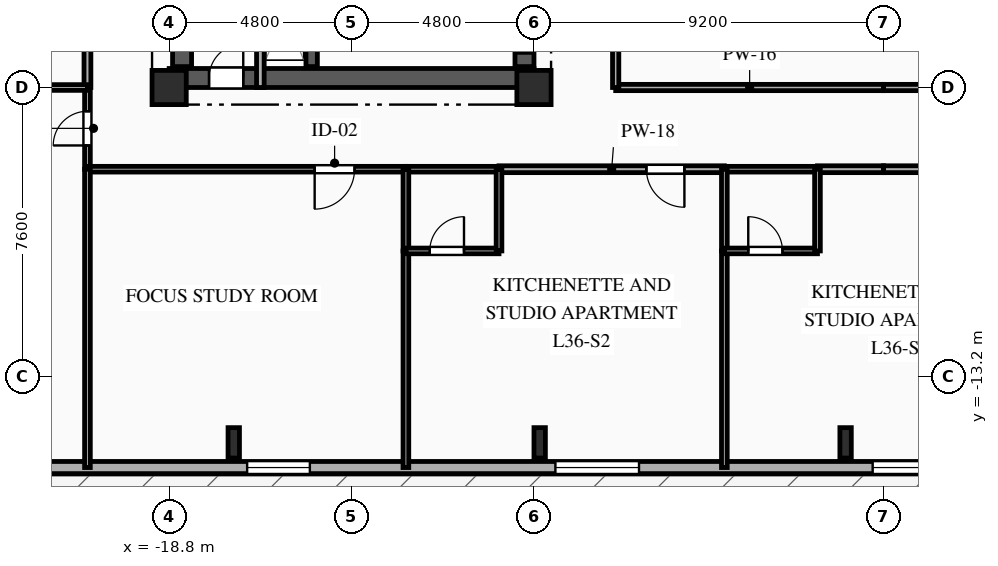
"""IFC4 building model, lengths in metres.
Left out: names, types, materials, properties, quantities, classifications, styles, units other than length and angle.
Written with IfcOpenShell. Run it as: python <this file> out.ifc"""

import sys

from ifc_helpers import new_model, si_unit, direction, frame, frame_2d, origin, origin_2d, place, context, subcontext, project, spatial, rectangle, i_section, extrude, element, fill, save


model = new_model("IFC4")
c1 = context("Model", 3, precision=1e-05, world=origin(), true_north=direction((0.0, 1.0)))
c2 = subcontext(c1, "Body", "Model", "MODEL_VIEW")
j1 = project(units=[si_unit("LENGTHUNIT", "METRE"), si_unit("PLANEANGLEUNIT", "RADIAN")], contexts=[c1])
p1 = place(None, origin())
s1 = spatial("IfcSite", under=j1, at=p1, CompositionType="ELEMENT")
p2 = place(p1, origin())
s2 = spatial("IfcBuilding", under=s1, at=p2, CompositionType="ELEMENT")
p3 = place(p2, frame((0.0, 0.0, 131.0)))
s3 = spatial("IfcBuildingStorey", under=s2, at=p3, CompositionType="ELEMENT", Elevation=131.0)
for number, where, z_axis, x_axis in (
    (1, (-18.8, -5.6, 0.0), (0.0, 0.0, 1.0), (1.0, 0.0, 0.0)),
    (2, (-9.2, -5.6, 0.0), (0.0, 0.0, 1.0), (1.0, 0.0, 0.0)),
):
    element("IfcColumn", number, at=place(p3, frame(where, z_axis=z_axis, x_axis=x_axis)), inside=s3, PredefinedType="COLUMN", context=c2, shape_type="SweptSolid", body=[
        extrude(rectangle(XDim=0.9, YDim=0.9, at=origin_2d()), origin(), (0.0, 0.0, 1.0), 3.35),
    ])
for number, where, z_axis, x_axis in (
    (3, (-17.1, -14.95, 0.0), (0.0, 0.0, 1.0), (1.0, 0.0, 0.0)),
    (4, (-9.05, -14.95, 0.0), (0.0, 0.0, 1.0), (1.0, 0.0, 0.0)),
    (5, (-1.0, -14.95, 0.0), (0.0, 0.0, 1.0), (1.0, 0.0, 0.0)),
):
    element("IfcColumn", number, at=place(p3, frame(where, z_axis=z_axis, x_axis=x_axis)), inside=s3, PredefinedType="COLUMN", context=c2, shape_type="SweptSolid", body=[
        extrude(i_section(OverallWidth=0.3, OverallDepth=0.8, WebThickness=0.018, FlangeThickness=0.033, FilletRadius=0.03, at=origin_2d()), origin(), (0.0, 0.0, 1.0), 3.35),
    ])
p4 = place(p3, frame((23.8, -15.6, 0.0), z_axis=(0.0, 0.0, 1.0), x_axis=(-1.0, 0.0, 0.0)))
e6 = element("IfcWall", 6, at=p4, inside=s3, PredefinedType="SOLIDWALL", context=c2, shape_type="SweptSolid", body=[
    extrude(rectangle(XDim=49.6, YDim=0.32, at=frame_2d((24.8, 0.0))), origin(), (0.0, 0.0, 1.0), 3.04),
])
p5 = place(p4, frame((1.13, 0.0, 0.85)))
e7 = element("IfcOpeningElement", 7, at=p5, cuts=e6, PredefinedType="OPENING", context=c2, shape_type="SweptSolid", body=[
    extrude(rectangle(XDim=1.1, YDim=1.85, at=frame_2d((0.55, 0.925))), frame((0.0, 0.17, 0.0), z_axis=(0.0, -1.0, 0.0), x_axis=(1.0, 0.0, 0.0)), (0.0, 0.0, 1.0), 0.34),
])
p6 = place(p4, frame((6.255, 0.0, 0.85)))
e8 = element("IfcOpeningElement", 8, at=p6, cuts=e6, PredefinedType="OPENING", context=c2, shape_type="SweptSolid", body=[
    extrude(rectangle(XDim=1.65, YDim=1.85, at=frame_2d((0.825, 0.925))), frame((0.0, 0.17, 0.0), z_axis=(0.0, -1.0, 0.0), x_axis=(1.0, 0.0, 0.0)), (0.0, 0.0, 1.0), 0.34),
])
p7 = place(p4, frame((14.38, 0.0, 0.85)))
e9 = element("IfcOpeningElement", 9, at=p7, cuts=e6, PredefinedType="OPENING", context=c2, shape_type="SweptSolid", body=[
    extrude(rectangle(XDim=2.2, YDim=1.85, at=frame_2d((1.1, 0.925))), frame((0.0, 0.17, 0.0), z_axis=(0.0, -1.0, 0.0), x_axis=(1.0, 0.0, 0.0)), (0.0, 0.0, 1.0), 0.34),
])
p8 = place(p4, frame((21.888, 0.0, 0.85)))
e10 = element("IfcOpeningElement", 10, at=p8, cuts=e6, PredefinedType="OPENING", context=c2, shape_type="SweptSolid", body=[
    extrude(rectangle(XDim=2.2, YDim=1.85, at=frame_2d((1.1, 0.925))), frame((0.0, 0.17, 0.0), z_axis=(0.0, -1.0, 0.0), x_axis=(1.0, 0.0, 0.0)), (0.0, 0.0, 1.0), 0.34),
])
p9 = place(p4, frame((30.236, 0.0, 0.85)))
e11 = element("IfcOpeningElement", 11, at=p9, cuts=e6, PredefinedType="OPENING", context=c2, shape_type="SweptSolid", body=[
    extrude(rectangle(XDim=2.2, YDim=1.85, at=frame_2d((1.1, 0.925))), frame((0.0, 0.17, 0.0), z_axis=(0.0, -1.0, 0.0), x_axis=(1.0, 0.0, 0.0)), (0.0, 0.0, 1.0), 0.34),
])
p10 = place(p4, frame((38.897, 0.0, 0.85)))
e12 = element("IfcOpeningElement", 12, at=p10, cuts=e6, PredefinedType="OPENING", context=c2, shape_type="SweptSolid", body=[
    extrude(rectangle(XDim=1.65, YDim=1.85, at=frame_2d((0.825, 0.925))), frame((0.0, 0.17, 0.0), z_axis=(0.0, -1.0, 0.0), x_axis=(1.0, 0.0, 0.0)), (0.0, 0.0, 1.0), 0.34),
])
p11 = place(p4, frame((46.175, 0.0, 0.85)))
e13 = element("IfcOpeningElement", 13, at=p11, cuts=e6, PredefinedType="OPENING", context=c2, shape_type="SweptSolid", body=[
    extrude(rectangle(XDim=1.65, YDim=1.85, at=frame_2d((0.825, 0.925))), frame((0.0, 0.17, 0.0), z_axis=(0.0, -1.0, 0.0), x_axis=(1.0, 0.0, 0.0)), (0.0, 0.0, 1.0), 0.34),
])
p12 = place(p3, frame((-23.376, -19.829, 0.0), z_axis=(0.0, 0.0, 1.0), x_axis=(0.994522202864, 0.104525537599, 0.0)))
e14 = element("IfcWall", 14, at=p12, inside=s3, PredefinedType="PARAPET", context=c2, shape_type="SweptSolid", body=[
    extrude(rectangle(XDim=38.546, YDim=0.22, at=frame_2d((19.273, 0.0))), origin(), (0.0, 0.0, 1.0), 0.65),
])
p13 = place(p3, frame((-18.8, -5.35, 0.0), z_axis=(0.0, 0.0, 1.0), x_axis=(1.0, 0.0, 0.0)))
e15 = element("IfcWall", 15, at=p13, inside=s3, PredefinedType="SHEAR", context=c2, shape_type="SweptSolid", body=[
    extrude(rectangle(XDim=9.6, YDim=0.5, at=frame_2d((4.8, 0.0))), origin(), (0.0, 0.0, 1.0), 3.04),
])
p14 = place(p13, frame((1.05, 0.0, 0.0)))
e16 = element("IfcOpeningElement", 16, at=p14, cuts=e15, PredefinedType="OPENING", context=c2, shape_type="SweptSolid", body=[
    extrude(rectangle(XDim=0.9, YDim=2.1, at=frame_2d((0.45, 1.05))), frame((0.0, 0.26, 0.0), z_axis=(0.0, -1.0, 0.0), x_axis=(1.0, 0.0, 0.0)), (0.0, 0.0, 1.0), 0.52),
])
p15 = place(p3, frame((-18.46, -5.05, 0.0), z_axis=(0.0, 0.0, 1.0), x_axis=(0.0, 1.0, 0.0)))
e17 = element("IfcWall", 17, at=p15, inside=s3, PredefinedType="SHEAR", context=c2, shape_type="SweptSolid", body=[
    extrude(rectangle(XDim=10.1, YDim=0.5, at=frame_2d((5.05, 0.0))), origin(), (0.0, 0.0, 1.0), 3.04),
])
p16 = place(p3, frame((-9.45, -5.05, 0.0), z_axis=(0.0, 0.0, 1.0), x_axis=(0.0, 1.0, 0.0)))
e18 = element("IfcWall", 18, at=p16, inside=s3, PredefinedType="SHEAR", context=c2, shape_type="SweptSolid", body=[
    extrude(rectangle(XDim=10.1, YDim=0.5, at=frame_2d((5.05, 0.0))), origin(), (0.0, 0.0, 1.0), 3.04),
])
p17 = place(p16, frame((7.15, 0.0, 0.0)))
e19 = element("IfcOpeningElement", 19, at=p17, cuts=e18, PredefinedType="OPENING", context=c2, shape_type="SweptSolid", body=[
    extrude(rectangle(XDim=0.9, YDim=2.1, at=frame_2d((0.45, 1.05))), frame((0.0, 0.26, 0.0), z_axis=(0.0, -1.0, 0.0), x_axis=(1.0, 0.0, 0.0)), (0.0, 0.0, 1.0), 0.52),
])
p18 = place(p16, frame((2.4, 0.0, 0.0)))
e20 = element("IfcOpeningElement", 20, at=p18, cuts=e18, PredefinedType="OPENING", context=c2, shape_type="SweptSolid", body=[
    extrude(rectangle(XDim=1.2, YDim=2.15, at=frame_2d((0.6, 1.075))), frame((0.0, 0.26, 0.0), z_axis=(0.0, -1.0, 0.0), x_axis=(1.0, 0.0, 0.0)), (0.0, 0.0, 1.0), 0.52),
])
p19 = place(p16, frame((0.35, 0.0, 0.0)))
e21 = element("IfcOpeningElement", 21, at=p19, cuts=e18, PredefinedType="OPENING", context=c2, shape_type="SweptSolid", body=[
    extrude(rectangle(XDim=0.9, YDim=2.1, at=frame_2d((0.45, 1.05))), frame((0.0, 0.26, 0.0), z_axis=(0.0, -1.0, 0.0), x_axis=(1.0, 0.0, 0.0)), (0.0, 0.0, 1.0), 0.52),
])
p20 = place(p16, frame((5.0, 0.0, 0.0)))
e22 = element("IfcOpeningElement", 22, at=p20, cuts=e18, PredefinedType="OPENING", context=c2, shape_type="SweptSolid", body=[
    extrude(rectangle(XDim=0.9, YDim=2.1, at=frame_2d((0.45, 1.05))), frame((0.0, 0.26, 0.0), z_axis=(0.0, -1.0, 0.0), x_axis=(1.0, 0.0, 0.0)), (0.0, 0.0, 1.0), 0.52),
])
p21 = place(p3, frame((-15.05, -5.05, 0.0), z_axis=(0.0, 0.0, 1.0), x_axis=(0.0, 1.0, 0.0)))
e23 = element("IfcWall", 23, at=p21, inside=s3, PredefinedType="SHEAR", context=c2, shape_type="SweptSolid", body=[
    extrude(rectangle(XDim=10.1, YDim=0.3, at=frame_2d((5.05, 0.0))), origin(), (0.0, 0.0, 1.0), 3.04),
])
p22 = place(p3, frame((-16.4, -5.6, 0.0), z_axis=(0.0, 0.0, 1.0), x_axis=(0.0, 1.0, 0.0)))
e24 = element("IfcWall", 24, at=p22, inside=s3, PredefinedType="PARTITIONING", context=c2, shape_type="SweptSolid", body=[
    extrude(rectangle(XDim=3.49, YDim=0.2, at=frame_2d((1.745, 0.0))), origin(), (0.0, 0.0, 1.0), 3.04),
])
p23 = place(p3, frame((-20.95, -7.75, 0.0), z_axis=(0.0, 0.0, 1.0), x_axis=(0.0, 1.0, 0.0)))
e25 = element("IfcWall", 25, at=p23, inside=s3, PredefinedType="PARTITIONING", context=c2, shape_type="SweptSolid", body=[
    extrude(rectangle(XDim=2.15, YDim=0.15, at=frame_2d((1.075, 0.0))), origin(), (0.0, 0.0, 1.0), 3.04),
])
p24 = place(p23, frame((0.625, 0.0, 0.0)))
e26 = element("IfcOpeningElement", 26, at=p24, cuts=e25, PredefinedType="OPENING", context=c2, shape_type="SweptSolid", body=[
    extrude(rectangle(XDim=0.9, YDim=2.1, at=frame_2d((0.45, 1.05))), frame((0.0, 0.085, 0.0), z_axis=(0.0, -1.0, 0.0), x_axis=(1.0, 0.0, 0.0)), (0.0, 0.0, 1.0), 0.17),
])
p25 = place(p3, frame((-12.57, -7.75, 0.0), z_axis=(0.0, 0.0, 1.0), x_axis=(-1.0, 0.0, 0.0)))
e27 = element("IfcWall", 27, at=p25, inside=s3, PredefinedType="PARTITIONING", context=c2, shape_type="SweptSolid", body=[
    extrude(rectangle(XDim=8.38, YDim=0.15, at=frame_2d((4.19, 0.0))), origin(), (0.0, 0.0, 1.0), 3.04),
])
p26 = place(p25, frame((1.351, 0.0, 0.0)))
e28 = element("IfcOpeningElement", 28, at=p26, cuts=e27, PredefinedType="OPENING", context=c2, shape_type="SweptSolid", body=[
    extrude(rectangle(XDim=1.05, YDim=2.15, at=frame_2d((0.525, 1.075))), frame((0.0, 0.085, 0.0), z_axis=(0.0, -1.0, 0.0), x_axis=(1.0, 0.0, 0.0)), (0.0, 0.0, 1.0), 0.17),
])
p27 = place(p3, frame((-4.19, -7.75, 0.0), z_axis=(0.0, 0.0, 1.0), x_axis=(-1.0, 0.0, 0.0)))
e29 = element("IfcWall", 29, at=p27, inside=s3, PredefinedType="PARTITIONING", context=c2, shape_type="SweptSolid", body=[
    extrude(rectangle(XDim=5.93, YDim=0.18, at=frame_2d((2.965, 0.0))), origin(), (0.0, 0.0, 1.0), 3.04),
])
p28 = place(p27, frame((1.051, 0.0, 0.0)))
e30 = element("IfcOpeningElement", 30, at=p28, cuts=e29, PredefinedType="OPENING", context=c2, shape_type="SweptSolid", body=[
    extrude(rectangle(XDim=1.0, YDim=2.15, at=frame_2d((0.5, 1.075))), frame((0.0, 0.1, 0.0), z_axis=(0.0, -1.0, 0.0), x_axis=(1.0, 0.0, 0.0)), (0.0, 0.0, 1.0), 0.2),
])
p29 = place(p3, frame((-10.12, -7.75, 0.0), z_axis=(0.0, 0.0, 1.0), x_axis=(-1.0, 0.0, 0.0)))
e31 = element("IfcWall", 31, at=p29, inside=s3, PredefinedType="PLUMBINGWALL", context=c2, shape_type="SweptSolid", body=[
    extrude(rectangle(XDim=2.45, YDim=0.15, at=frame_2d((1.225, 0.0))), origin(), (0.0, 0.0, 1.0), 3.04),
])
p30 = place(p3, frame((0.0, -7.75, 0.0), z_axis=(0.0, 0.0, 1.0), x_axis=(-1.0, 0.0, 0.0)))
e32 = element("IfcWall", 32, at=p30, inside=s3, PredefinedType="PARTITIONING", context=c2, shape_type="SweptSolid", body=[
    extrude(rectangle(XDim=1.74, YDim=0.18, at=frame_2d((0.87, 0.0))), origin(), (0.0, 0.0, 1.0), 3.04),
])
p31 = place(p3, frame((-1.74, -7.75, 0.0), z_axis=(0.0, 0.0, 1.0), x_axis=(-1.0, 0.0, 0.0)))
e33 = element("IfcWall", 33, at=p31, inside=s3, PredefinedType="PLUMBINGWALL", context=c2, shape_type="SweptSolid", body=[
    extrude(rectangle(XDim=2.45, YDim=0.15, at=frame_2d((1.225, 0.0))), origin(), (0.0, 0.0, 1.0), 3.04),
])
p32 = place(p3, frame((-7.05, -5.6, 0.0), z_axis=(0.0, 0.0, 1.0), x_axis=(1.0, 0.0, 0.0)))
e34 = element("IfcWall", 34, at=p32, inside=s3, PredefinedType="PARTITIONING", context=c2, shape_type="SweptSolid", body=[
    extrude(rectangle(XDim=7.05, YDim=0.165, at=frame_2d((3.525, 0.0))), origin(), (0.0, 0.0, 1.0), 2.525),
])
p33 = place(p3, frame((4.19, -7.75, 0.0), z_axis=(0.0, 0.0, 1.0), x_axis=(-1.0, 0.0, 0.0)))
e35 = element("IfcWall", 35, at=p33, inside=s3, PredefinedType="PARTITIONING", context=c2, shape_type="SweptSolid", body=[
    extrude(rectangle(XDim=4.19, YDim=0.18, at=frame_2d((2.095, 0.0))), origin(), (0.0, 0.0, 1.0), 3.04),
])
p34 = place(p33, frame((2.103, 0.0, 0.0)))
e36 = element("IfcOpeningElement", 36, at=p34, cuts=e35, PredefinedType="OPENING", context=c2, shape_type="SweptSolid", body=[
    extrude(rectangle(XDim=1.0, YDim=2.15, at=frame_2d((0.5, 1.075))), frame((0.0, 0.1, 0.0), z_axis=(0.0, -1.0, 0.0), x_axis=(1.0, 0.0, 0.0)), (0.0, 0.0, 1.0), 0.2),
])
p35 = place(p3, frame((0.0, -5.6, 0.0), z_axis=(0.0, 0.0, 1.0), x_axis=(1.0, 0.0, 0.0)))
e37 = element("IfcWall", 37, at=p35, inside=s3, PredefinedType="PARTITIONING", context=c2, shape_type="SweptSolid", body=[
    extrude(rectangle(XDim=7.05, YDim=0.165, at=frame_2d((3.525, 0.0))), origin(), (0.0, 0.0, 1.0), 2.525),
])
p36 = place(p3, frame((-20.95, -5.6, 0.0), z_axis=(0.0, 0.0, 1.0), x_axis=(0.0, 1.0, 0.0)))
e38 = element("IfcWall", 38, at=p36, inside=s3, PredefinedType="PARTITIONING", context=c2, shape_type="SweptSolid", body=[
    extrude(rectangle(XDim=14.1, YDim=0.18, at=frame_2d((7.05, 0.0))), origin(), (0.0, 0.0, 1.0), 3.04),
])
p37 = place(p36, frame((5.058, 0.0, 0.0)))
e39 = element("IfcOpeningElement", 39, at=p37, cuts=e38, PredefinedType="OPENING", context=c2, shape_type="SweptSolid", body=[
    extrude(rectangle(XDim=1.0, YDim=2.15, at=frame_2d((0.5, 1.075))), frame((0.0, 0.1, 0.0), z_axis=(0.0, -1.0, 0.0), x_axis=(1.0, 0.0, 0.0)), (0.0, 0.0, 1.0), 0.2),
])
p38 = place(p3, frame((-7.05, -2.95, 0.0), z_axis=(0.0, 0.0, 1.0), x_axis=(0.0, -1.0, 0.0)))
e40 = element("IfcWall", 40, at=p38, inside=s3, PredefinedType="PARTITIONING", context=c2, shape_type="SweptSolid", body=[
    extrude(rectangle(XDim=2.65, YDim=0.165, at=frame_2d((1.325, 0.0))), origin(), (0.0, 0.0, 1.0), 3.04),
])
p39 = place(p3, frame((-20.95, -5.6, 0.0), z_axis=(0.0, 0.0, 1.0), x_axis=(-1.0, 0.0, 0.0)))
e41 = element("IfcWall", 41, at=p39, inside=s3, PredefinedType="PARTITIONING", context=c2, shape_type="SweptSolid", body=[
    extrude(rectangle(XDim=2.65, YDim=0.15, at=frame_2d((1.325, 0.0))), origin(), (0.0, 0.0, 1.0), 3.04),
])
p40 = place(p39, frame((0.965, 0.0, 0.0)))
e42 = element("IfcOpeningElement", 42, at=p40, cuts=e41, PredefinedType="OPENING", context=c2, shape_type="SweptSolid", body=[
    extrude(rectangle(XDim=1.05, YDim=2.15, at=frame_2d((0.525, 1.075))), frame((0.0, 0.085, 0.0), z_axis=(0.0, -1.0, 0.0), x_axis=(1.0, 0.0, 0.0)), (0.0, 0.0, 1.0), 0.17),
])
p41 = place(p3, frame((-20.95, -7.75, 0.0), z_axis=(0.0, 0.0, 1.0), x_axis=(0.0, -1.0, 0.0)))
e43 = element("IfcWall", 43, at=p41, inside=s3, PredefinedType="PARTITIONING", context=c2, shape_type="SweptSolid", body=[
    extrude(rectangle(XDim=7.85, YDim=0.15, at=frame_2d((3.925, 0.0))), origin(), (0.0, 0.0, 1.0), 3.04),
])
p42 = place(p3, frame((-12.57, -9.9, 0.0), z_axis=(0.0, 0.0, 1.0), x_axis=(0.0, -1.0, 0.0)))
e44 = element("IfcWall", 44, at=p42, inside=s3, PredefinedType="PARTITIONING", context=c2, shape_type="SweptSolid", body=[
    extrude(rectangle(XDim=5.7, YDim=0.15, at=frame_2d((2.85, 0.0))), origin(), (0.0, 0.0, 1.0), 3.04),
])
p43 = place(p3, frame((-12.57, -7.75, 0.0), z_axis=(0.0, 0.0, 1.0), x_axis=(0.0, -1.0, 0.0)))
e45 = element("IfcWall", 45, at=p43, inside=s3, PredefinedType="PLUMBINGWALL", context=c2, shape_type="SweptSolid", body=[
    extrude(rectangle(XDim=2.15, YDim=0.15, at=frame_2d((1.075, 0.0))), origin(), (0.0, 0.0, 1.0), 3.04),
])
p44 = place(p3, frame((-12.57, -9.9, 0.0), z_axis=(0.0, 0.0, 1.0), x_axis=(1.0, 0.0, 0.0)))
e46 = element("IfcWall", 46, at=p44, inside=s3, PredefinedType="PLUMBINGWALL", context=c2, shape_type="SweptSolid", body=[
    extrude(rectangle(XDim=2.45, YDim=0.15, at=frame_2d((1.225, 0.0))), origin(), (0.0, 0.0, 1.0), 3.04),
])
p45 = place(p44, frame((0.629, 0.0, 0.0)))
e47 = element("IfcOpeningElement", 47, at=p45, cuts=e46, PredefinedType="OPENING", context=c2, shape_type="SweptSolid", body=[
    extrude(rectangle(XDim=0.9, YDim=2.1, at=frame_2d((0.45, 1.05))), frame((0.0, 0.085, 0.0), z_axis=(0.0, -1.0, 0.0), x_axis=(1.0, 0.0, 0.0)), (0.0, 0.0, 1.0), 0.17),
])
p46 = place(p3, frame((-10.12, -9.9, 0.0), z_axis=(0.0, 0.0, 1.0), x_axis=(0.0, 1.0, 0.0)))
e48 = element("IfcWall", 48, at=p46, inside=s3, PredefinedType="PLUMBINGWALL", context=c2, shape_type="SweptSolid", body=[
    extrude(rectangle(XDim=2.15, YDim=0.15, at=frame_2d((1.075, 0.0))), origin(), (0.0, 0.0, 1.0), 3.04),
])
p47 = place(p3, frame((-4.19, -9.9, 0.0), z_axis=(0.0, 0.0, 1.0), x_axis=(0.0, -1.0, 0.0)))
e49 = element("IfcWall", 49, at=p47, inside=s3, PredefinedType="PARTITIONING", context=c2, shape_type="SweptSolid", body=[
    extrude(rectangle(XDim=5.7, YDim=0.15, at=frame_2d((2.85, 0.0))), origin(), (0.0, 0.0, 1.0), 3.04),
])
p48 = place(p3, frame((-4.19, -7.75, 0.0), z_axis=(0.0, 0.0, 1.0), x_axis=(0.0, -1.0, 0.0)))
e50 = element("IfcWall", 50, at=p48, inside=s3, PredefinedType="PLUMBINGWALL", context=c2, shape_type="SweptSolid", body=[
    extrude(rectangle(XDim=2.15, YDim=0.15, at=frame_2d((1.075, 0.0))), origin(), (0.0, 0.0, 1.0), 3.04),
])
p49 = place(p3, frame((-4.19, -9.9, 0.0), z_axis=(0.0, 0.0, 1.0), x_axis=(1.0, 0.0, 0.0)))
e51 = element("IfcWall", 51, at=p49, inside=s3, PredefinedType="PLUMBINGWALL", context=c2, shape_type="SweptSolid", body=[
    extrude(rectangle(XDim=2.45, YDim=0.15, at=frame_2d((1.225, 0.0))), origin(), (0.0, 0.0, 1.0), 3.04),
])
p50 = place(p49, frame((0.629, 0.0, 0.0)))
e52 = element("IfcOpeningElement", 52, at=p50, cuts=e51, PredefinedType="OPENING", context=c2, shape_type="SweptSolid", body=[
    extrude(rectangle(XDim=0.9, YDim=2.1, at=frame_2d((0.45, 1.05))), frame((0.0, 0.085, 0.0), z_axis=(0.0, -1.0, 0.0), x_axis=(1.0, 0.0, 0.0)), (0.0, 0.0, 1.0), 0.17),
])
p51 = place(p3, frame((-1.74, -9.9, 0.0), z_axis=(0.0, 0.0, 1.0), x_axis=(0.0, 1.0, 0.0)))
e53 = element("IfcWall", 53, at=p51, inside=s3, PredefinedType="PLUMBINGWALL", context=c2, shape_type="SweptSolid", body=[
    extrude(rectangle(XDim=2.15, YDim=0.15, at=frame_2d((1.075, 0.0))), origin(), (0.0, 0.0, 1.0), 3.04),
])
p52 = place(p8, origin())
e54 = element("IfcWindow", 54, at=p52, inside=s3, PartitioningType="SINGLE_PANEL", PredefinedType="WINDOW", context=c2, shape_type="SweptSolid", body=[
    extrude(rectangle(XDim=2.2, YDim=1.85, at=frame_2d((1.1, 0.925))), frame((0.0, 0.03, 0.0), z_axis=(0.0, -1.0, 0.0), x_axis=(1.0, 0.0, 0.0)), (0.0, 0.0, 1.0), 0.06),
])
fill(e10, e54)
p53 = place(p9, origin())
e55 = element("IfcWindow", 55, at=p53, inside=s3, PartitioningType="SINGLE_PANEL", PredefinedType="WINDOW", context=c2, shape_type="SweptSolid", body=[
    extrude(rectangle(XDim=2.2, YDim=1.85, at=frame_2d((1.1, 0.925))), frame((0.0, 0.03, 0.0), z_axis=(0.0, -1.0, 0.0), x_axis=(1.0, 0.0, 0.0)), (0.0, 0.0, 1.0), 0.06),
])
fill(e11, e55)
p54 = place(p10, origin())
e56 = element("IfcWindow", 56, at=p54, inside=s3, PartitioningType="SINGLE_PANEL", PredefinedType="WINDOW", context=c2, shape_type="SweptSolid", body=[
    extrude(rectangle(XDim=1.65, YDim=1.85, at=frame_2d((0.825, 0.925))), frame((0.0, 0.03, 0.0), z_axis=(0.0, -1.0, 0.0), x_axis=(1.0, 0.0, 0.0)), (0.0, 0.0, 1.0), 0.06),
])
fill(e12, e56)
p55 = place(p14, origin())
e57 = element("IfcDoor", 57, at=p55, inside=s3, OperationType="SINGLE_SWING_RIGHT", PredefinedType="DOOR", context=c2, shape_type="SweptSolid", body=[
    extrude(rectangle(XDim=0.9, YDim=2.1, at=frame_2d((0.45, 1.05))), frame((0.0, 0.025, 0.0), z_axis=(0.0, -1.0, 0.0), x_axis=(1.0, 0.0, 0.0)), (0.0, 0.0, 1.0), 0.05),
])
fill(e16, e57)
p56 = place(p19, origin())
e58 = element("IfcDoor", 58, at=p56, inside=s3, OperationType="SINGLE_SWING_RIGHT", PredefinedType="DOOR", context=c2, shape_type="SweptSolid", body=[
    extrude(rectangle(XDim=0.9, YDim=2.1, at=frame_2d((0.45, 1.05))), frame((0.0, 0.025, 0.0), z_axis=(0.0, -1.0, 0.0), x_axis=(1.0, 0.0, 0.0)), (0.0, 0.0, 1.0), 0.05),
])
fill(e21, e58)
p57 = place(p24, origin())
e59 = element("IfcDoor", 59, at=p57, inside=s3, OperationType="SINGLE_SWING_LEFT", PredefinedType="DOOR", context=c2, shape_type="SweptSolid", body=[
    extrude(rectangle(XDim=0.9, YDim=2.1, at=frame_2d((0.45, 1.05))), frame((0.0, 0.025, 0.0), z_axis=(0.0, -1.0, 0.0), x_axis=(1.0, 0.0, 0.0)), (0.0, 0.0, 1.0), 0.05),
])
fill(e26, e59)
p58 = place(p26, origin())
e60 = element("IfcDoor", 60, at=p58, inside=s3, OperationType="SINGLE_SWING_RIGHT", PredefinedType="DOOR", context=c2, shape_type="SweptSolid", body=[
    extrude(rectangle(XDim=1.05, YDim=2.15, at=frame_2d((0.525, 1.075))), frame((0.0, 0.025, 0.0), z_axis=(0.0, -1.0, 0.0), x_axis=(1.0, 0.0, 0.0)), (0.0, 0.0, 1.0), 0.05),
])
fill(e28, e60)
p59 = place(p28, origin())
e61 = element("IfcDoor", 61, at=p59, inside=s3, OperationType="SINGLE_SWING_LEFT", PredefinedType="DOOR", context=c2, shape_type="SweptSolid", body=[
    extrude(rectangle(XDim=1.0, YDim=2.15, at=frame_2d((0.5, 1.075))), frame((0.0, 0.025, 0.0), z_axis=(0.0, -1.0, 0.0), x_axis=(1.0, 0.0, 0.0)), (0.0, 0.0, 1.0), 0.05),
])
fill(e30, e61)
p60 = place(p45, origin())
e62 = element("IfcDoor", 62, at=p60, inside=s3, OperationType="SINGLE_SWING_RIGHT", PredefinedType="DOOR", context=c2, shape_type="SweptSolid", body=[
    extrude(rectangle(XDim=0.9, YDim=2.1, at=frame_2d((0.45, 1.05))), frame((0.0, 0.025, 0.0), z_axis=(0.0, -1.0, 0.0), x_axis=(1.0, 0.0, 0.0)), (0.0, 0.0, 1.0), 0.05),
])
fill(e47, e62)
p61 = place(p50, origin())
e63 = element("IfcDoor", 63, at=p61, inside=s3, OperationType="SINGLE_SWING_LEFT", PredefinedType="DOOR", context=c2, shape_type="SweptSolid", body=[
    extrude(rectangle(XDim=0.9, YDim=2.1, at=frame_2d((0.45, 1.05))), frame((0.0, 0.025, 0.0), z_axis=(0.0, -1.0, 0.0), x_axis=(1.0, 0.0, 0.0)), (0.0, 0.0, 1.0), 0.05),
])
fill(e52, e63)
save(model, sys.argv[1])
